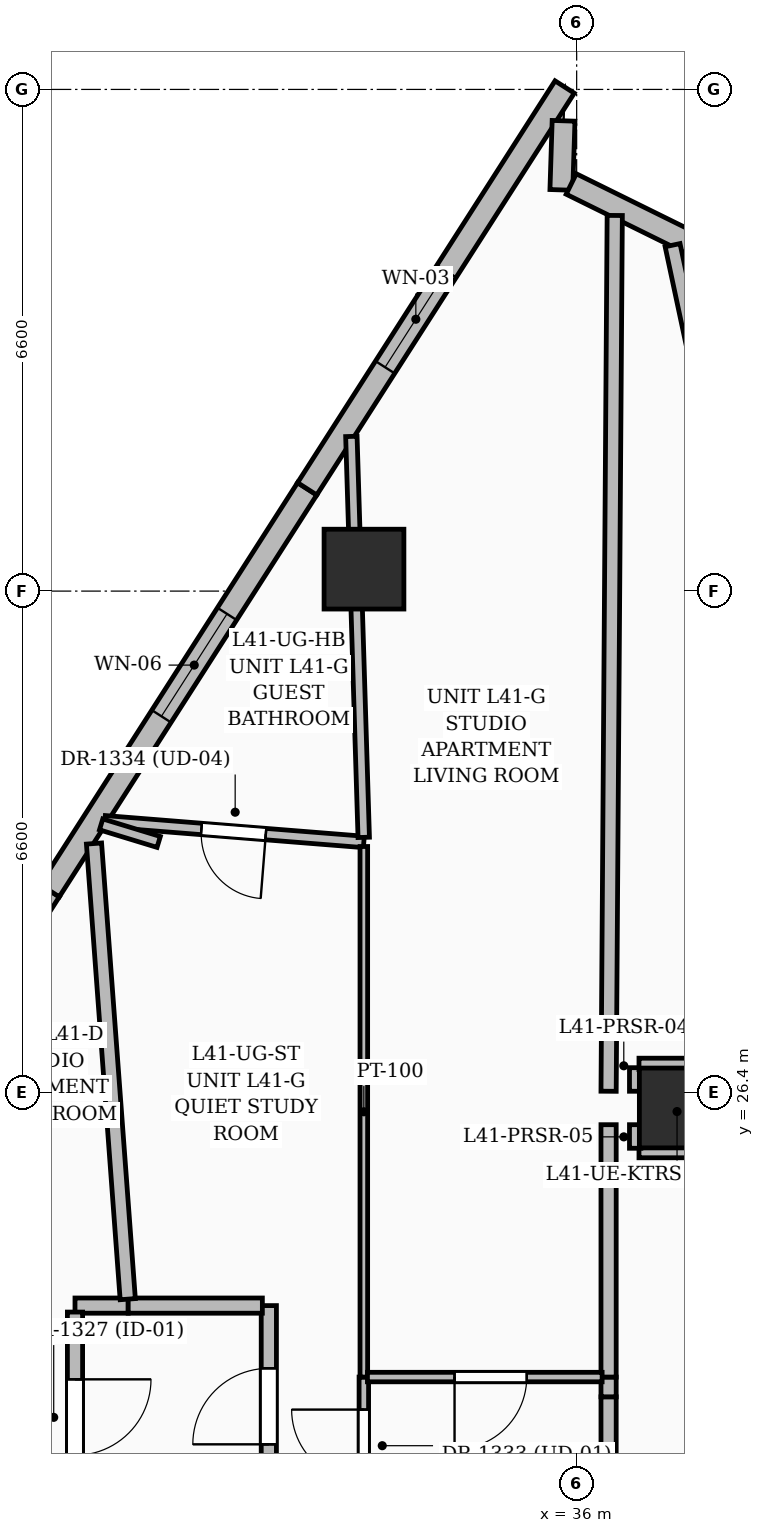
"""IFC4 building model, lengths in metres.
Left out: names, types, materials, properties, quantities, classifications, styles, units other than length and angle.
Written with IfcOpenShell. Run it as: python <this file> out.ifc"""

import sys

from ifc_helpers import new_model, si_unit, direction, frame, frame_2d, origin, origin_2d, place, context, subcontext, project, spatial, rectangle, extrude, element, fill, save


model = new_model("IFC4")
c1 = context("Model", 3, precision=1e-05, world=origin(), true_north=direction((0.0, 1.0)))
c2 = subcontext(c1, "Body", "Model", "MODEL_VIEW")
j1 = project(units=[si_unit("LENGTHUNIT", "METRE"), si_unit("PLANEANGLEUNIT", "RADIAN")], contexts=[c1])
p1 = place(None, origin())
s1 = spatial("IfcSite", under=j1, at=p1, CompositionType="ELEMENT")
p2 = place(p1, origin())
s2 = spatial("IfcBuilding", under=s1, at=p2, CompositionType="ELEMENT")
p3 = place(p2, frame((0.0, 0.0, 160.8)))
s3 = spatial("IfcBuildingStorey", under=s2, at=p3, CompositionType="ELEMENT", Elevation=160.8)
for number, where, z_axis, x_axis in (
    (1, (37.35, 26.2, 0.0), (0.0, 0.0, 1.0), (1.0, 0.0, 0.0)),
    (2, (33.202, 33.289, 0.0), (0.0, 0.0, 1.0), (1.0, 0.0, 0.0)),
):
    element("IfcColumn", number, at=place(p3, frame(where, z_axis=z_axis, x_axis=x_axis)), inside=s3, PredefinedType="COLUMN", context=c2, shape_type="SweptSolid", body=[
        extrude(rectangle(XDim=1.05, YDim=1.05, at=origin_2d()), origin(), (0.0, 0.0, 1.0), 3.6),
    ])
p4 = place(p3, frame((25.679, 23.772, 0.0), z_axis=(0.0, 0.0, 1.0), x_axis=(0.539489448276, 0.841992360535, 0.0)))
e3 = element("IfcWall", 3, at=p4, inside=s3, PredefinedType="SOLIDWALL", context=c2, shape_type="SweptSolid", body=[
    extrude(rectangle(XDim=6.279, YDim=0.3, at=frame_2d((3.14, 0.0))), origin(), (0.0, 0.0, 1.0), 3.35),
])
p5 = place(p4, frame((2.125, 0.0, 0.6)))
e4 = element("IfcOpeningElement", 4, at=p5, cuts=e3, PredefinedType="OPENING", context=c2, shape_type="SweptSolid", body=[
    extrude(rectangle(XDim=1.8, YDim=2.1, at=frame_2d((0.9, 1.05))), frame((0.0, 0.16, 0.0), z_axis=(0.0, -1.0, 0.0), x_axis=(1.0, 0.0, 0.0)), (0.0, 0.0, 1.0), 0.32),
])
p6 = place(p3, frame((29.067, 29.059, 0.0), z_axis=(0.0, 0.0, 1.0), x_axis=(0.539534675603, 0.841963380333, 0.0)))
e5 = element("IfcWall", 5, at=p6, inside=s3, PredefinedType="SOLIDWALL", context=c2, shape_type="SweptSolid", body=[
    extrude(rectangle(XDim=6.279, YDim=0.3, at=frame_2d((3.139, 0.0))), origin(), (0.0, 0.0, 1.0), 3.35),
])
p7 = place(p6, frame((2.725, 0.0, 0.55)))
e6 = element("IfcOpeningElement", 6, at=p7, cuts=e5, PredefinedType="OPENING", context=c2, shape_type="SweptSolid", body=[
    extrude(rectangle(XDim=1.6, YDim=2.2, at=frame_2d((0.8, 1.1))), frame((0.0, 0.16, 0.0), z_axis=(0.0, -1.0, 0.0), x_axis=(1.0, 0.0, 0.0)), (0.0, 0.0, 1.0), 0.32),
])
p8 = place(p3, frame((32.455, 34.345, 0.0), z_axis=(0.0, 0.0, 1.0), x_axis=(0.539489448276, 0.841992360535, 0.0)))
e7 = element("IfcWall", 7, at=p8, inside=s3, PredefinedType="SOLIDWALL", context=c2, shape_type="SweptSolid", body=[
    extrude(rectangle(XDim=6.279, YDim=0.3, at=frame_2d((3.14, 0.0))), origin(), (0.0, 0.0, 1.0), 3.35),
])
p9 = place(p8, frame((1.9, 0.0, 0.6)))
e8 = element("IfcOpeningElement", 8, at=p9, cuts=e7, PredefinedType="OPENING", context=c2, shape_type="SweptSolid", body=[
    extrude(rectangle(XDim=1.5, YDim=2.1, at=frame_2d((0.75, 1.05))), frame((0.0, 0.16, 0.0), z_axis=(0.0, -1.0, 0.0), x_axis=(1.0, 0.0, 0.0)), (0.0, 0.0, 1.0), 0.32),
])
p10 = place(p3, frame((35.828, 39.187, 0.0), z_axis=(0.0, 0.0, 1.0), x_axis=(-0.031938584897, -0.999489833262, 0.0)))
e9 = element("IfcWall", 9, at=p10, inside=s3, PredefinedType="SOLIDWALL", context=c2, shape_type="SweptSolid", body=[
    extrude(rectangle(XDim=0.91, YDim=0.3, at=frame_2d((0.455, 0.0))), origin(), (0.0, 0.0, 1.0), 3.35),
])
p11 = place(p3, frame((35.928, 38.356, 0.0), z_axis=(0.0, 0.0, 1.0), x_axis=(0.896845505116, -0.442343915922, 0.0)))
e10 = element("IfcWall", 10, at=p11, inside=s3, PredefinedType="SOLIDWALL", context=c2, shape_type="SweptSolid", body=[
    extrude(rectangle(XDim=2.249, YDim=0.3, at=frame_2d((1.125, 0.0))), origin(), (0.0, 0.0, 1.0), 3.35),
])
p12 = place(p3, frame((30.1, 23.6, 0.0), z_axis=(0.0, 0.0, 1.0), x_axis=(-1.0, 0.0, 0.0)))
e11 = element("IfcWall", 11, at=p12, inside=s3, PredefinedType="PARTITIONING", context=c2, shape_type="SweptSolid", body=[
    extrude(rectangle(XDim=0.7, YDim=0.2, at=frame_2d((0.35, 0.0))), origin(), (0.0, 0.0, 1.0), 2.393),
])
p13 = place(p3, frame((29.4, 23.515, 0.0), z_axis=(0.0, 0.0, 1.0), x_axis=(0.0, -1.0, 0.0)))
e12 = element("IfcWall", 12, at=p13, inside=s3, PredefinedType="PARTITIONING", context=c2, shape_type="SweptSolid", body=[
    extrude(rectangle(XDim=2.855, YDim=0.2, at=frame_2d((1.427, 0.0))), origin(), (0.0, 0.0, 1.0), 2.393),
])
p14 = place(p13, frame((0.885, 0.0, 0.0)))
e13 = element("IfcOpeningElement", 13, at=p14, cuts=e12, PredefinedType="OPENING", context=c2, shape_type="SweptSolid", body=[
    extrude(rectangle(XDim=1.0, YDim=2.2, at=frame_2d((0.5, 1.1))), frame((0.0, 0.11, 0.0), z_axis=(0.0, -1.0, 0.0), x_axis=(1.0, 0.0, 0.0)), (0.0, 0.0, 1.0), 0.22),
])
p15 = place(p3, frame((31.95, 20.95, 0.0), z_axis=(0.0, 0.0, 1.0), x_axis=(0.0, 1.0, 0.0)))
e14 = element("IfcWall", 14, at=p15, inside=s3, PredefinedType="PARTITIONING", context=c2, shape_type="SweptSolid", body=[
    extrude(rectangle(XDim=2.65, YDim=0.2, at=frame_2d((1.325, 0.0))), origin(), (0.0, 0.0, 1.0), 2.393),
])
p16 = place(p15, frame((0.825, 0.0, 0.0)))
e15 = element("IfcOpeningElement", 15, at=p16, cuts=e14, PredefinedType="OPENING", context=c2, shape_type="SweptSolid", body=[
    extrude(rectangle(XDim=1.0, YDim=2.2, at=frame_2d((0.5, 1.1))), frame((0.0, 0.11, 0.0), z_axis=(0.0, -1.0, 0.0), x_axis=(1.0, 0.0, 0.0)), (0.0, 0.0, 1.0), 0.22),
])
p17 = place(p3, frame((31.865, 23.6, 0.0), z_axis=(0.0, 0.0, 1.0), x_axis=(-1.0, 0.0, 0.0)))
e16 = element("IfcWall", 16, at=p17, inside=s3, PredefinedType="PARTITIONING", context=c2, shape_type="SweptSolid", body=[
    extrude(rectangle(XDim=1.765, YDim=0.2, at=frame_2d((0.882, 0.0))), origin(), (0.0, 0.0, 1.0), 2.709),
])
p18 = place(p3, frame((30.094, 23.685, 0.0), z_axis=(0.0, 0.0, 1.0), x_axis=(-0.073885151141, 0.997266756912, 0.0)))
e17 = element("IfcWall", 17, at=p18, inside=s3, PredefinedType="PARTITIONING", context=c2, shape_type="SweptSolid", body=[
    extrude(rectangle(XDim=6.01, YDim=0.2, at=frame_2d((3.005, 0.0))), origin(), (0.0, 0.0, 1.0), 2.57),
])
p19 = place(p3, frame((36.42, 22.4, 0.0), z_axis=(0.0, 0.0, 1.0), x_axis=(0.0, -1.0, 0.0)))
e18 = element("IfcWall", 18, at=p19, inside=s3, PredefinedType="PARTITIONING", context=c2, shape_type="SweptSolid", body=[
    extrude(rectangle(XDim=4.565, YDim=0.2, at=frame_2d((2.282, 0.0))), origin(), (0.0, 0.0, 1.0), 2.853),
])
p20 = place(p3, frame((36.42, 22.66, 0.0), z_axis=(0.0, 0.0, 1.0), x_axis=(0.0, -1.0, 0.0)))
e19 = element("IfcWall", 19, at=p20, inside=s3, PredefinedType="PARTITIONING", context=c2, shape_type="SweptSolid", body=[
    extrude(rectangle(XDim=0.26, YDim=0.2, at=frame_2d((0.13, 0.0))), origin(), (0.0, 0.0, 1.0), 3.35),
])
p21 = place(p3, frame((36.42, 25.98, 0.0), z_axis=(0.0, 0.0, 1.0), x_axis=(0.0, -1.0, 0.0)))
e20 = element("IfcWall", 20, at=p21, inside=s3, PredefinedType="PARTITIONING", context=c2, shape_type="SweptSolid", body=[
    extrude(rectangle(XDim=3.32, YDim=0.2, at=frame_2d((1.66, 0.0))), origin(), (0.0, 0.0, 1.0), 2.436),
])
p22 = place(p3, frame((36.501, 37.942, 0.0), z_axis=(0.0, 0.0, 1.0), x_axis=(-0.007034618495, -0.999975256765, 0.0)))
e21 = element("IfcWall", 21, at=p22, inside=s3, PredefinedType="PARTITIONING", context=c2, shape_type="SweptSolid", body=[
    extrude(rectangle(XDim=11.522, YDim=0.2, at=frame_2d((5.761, 0.0))), origin(), (0.0, 0.0, 1.0), 2.393),
])
p23 = place(p3, frame((38.83, 30.21, 0.0), z_axis=(0.0, 0.0, 1.0), x_axis=(-0.208896033751, 0.977937854407, 0.0)))
e22 = element("IfcWall", 22, at=p23, inside=s3, PredefinedType="PARTITIONING", context=c2, shape_type="SweptSolid", body=[
    extrude(rectangle(XDim=7.507, YDim=0.2, at=frame_2d((3.753, 0.0))), origin(), (0.0, 0.0, 1.0), 2.57),
])
p24 = place(p3, frame((33.2, 29.7, 0.0), z_axis=(0.0, 0.0, 1.0), x_axis=(-0.996817095408, 0.079722508132, 0.0)))
e23 = element("IfcWall", 23, at=p24, inside=s3, PredefinedType="PARTITIONING", context=c2, shape_type="SweptSolid", body=[
    extrude(rectangle(XDim=3.418, YDim=0.15, at=frame_2d((1.709, 0.0))), origin(), (0.0, 0.0, 1.0), 2.57),
])
p25 = place(p24, frame((1.293, 0.0, 0.0)))
e24 = element("IfcOpeningElement", 24, at=p25, cuts=e23, PredefinedType="OPENING", context=c2, shape_type="SweptSolid", body=[
    extrude(rectangle(XDim=0.85, YDim=2.1, at=frame_2d((0.425, 1.05))), frame((0.0, 0.085, 0.0), z_axis=(0.0, -1.0, 0.0), x_axis=(1.0, 0.0, 0.0)), (0.0, 0.0, 1.0), 0.17),
])
p26 = place(p3, frame((33.2, 20.998, 0.0), z_axis=(0.0, 0.0, 1.0), x_axis=(0.0, 1.0, 0.0)))
e25 = element("IfcWall", 25, at=p26, inside=s3, PredefinedType="PARTITIONING", context=c2, shape_type="SweptSolid", body=[
    extrude(rectangle(XDim=1.662, YDim=0.125, at=frame_2d((0.831, 0.0))), origin(), (0.0, 0.0, 1.0), 2.709),
])
p27 = place(p26, frame((0.284, 0.0, 0.0)))
e26 = element("IfcOpeningElement", 26, at=p27, cuts=e25, PredefinedType="OPENING", context=c2, shape_type="SweptSolid", body=[
    extrude(rectangle(XDim=0.95, YDim=2.2, at=frame_2d((0.475, 1.1))), frame((0.0, 0.072, 0.0), z_axis=(0.0, -1.0, 0.0), x_axis=(1.0, 0.0, 0.0)), (0.0, 0.0, 1.0), 0.145),
])
p28 = place(p3, frame((33.2, 22.66, 0.0), z_axis=(0.0, 0.0, 1.0), x_axis=(0.0, 1.0, 0.0)))
e27 = element("IfcWall", 27, at=p28, inside=s3, PredefinedType="PARTITIONING", context=c2, shape_type="SweptSolid", body=[
    extrude(rectangle(XDim=6.98, YDim=0.1, at=frame_2d((3.49, 0.0))), origin(), (0.0, 0.0, 1.0), 2.709),
])
p29 = place(p3, frame((33.199, 29.76, 0.0), z_axis=(0.0, 0.0, 1.0), x_axis=(-0.030856354446, 0.999523829326, 0.0)))
e28 = element("IfcWall", 28, at=p29, inside=s3, PredefinedType="PARTITIONING", context=c2, shape_type="SweptSolid", body=[
    extrude(rectangle(XDim=5.277, YDim=0.15, at=frame_2d((2.639, 0.0))), origin(), (0.0, 0.0, 1.0), 2.57),
])
p30 = place(p3, frame((36.335, 22.66, 0.0), z_axis=(0.0, 0.0, 1.0), x_axis=(-1.0, 0.0, 0.0)))
e29 = element("IfcWall", 29, at=p30, inside=s3, PredefinedType="PARTITIONING", context=c2, shape_type="SweptSolid", body=[
    extrude(rectangle(XDim=3.087, YDim=0.125, at=frame_2d((1.544, 0.0))), origin(), (0.0, 0.0, 1.0), 2.436),
])
p31 = place(p30, frame((0.991, 0.0, 0.0)))
e30 = element("IfcOpeningElement", 30, at=p31, cuts=e29, PredefinedType="OPENING", context=c2, shape_type="SweptSolid", body=[
    extrude(rectangle(XDim=0.95, YDim=2.2, at=frame_2d((0.475, 1.1))), frame((0.0, 0.072, 0.0), z_axis=(0.0, -1.0, 0.0), x_axis=(1.0, 0.0, 0.0)), (0.0, 0.0, 1.0), 0.145),
])
p32 = place(p3, frame((29.744, 29.931, 0.0), z_axis=(0.0, 0.0, 1.0), x_axis=(0.956483166449, -0.291787512241, 0.0)))
e31 = element("IfcWall", 31, at=p32, inside=s3, PredefinedType="PARTITIONING", context=c2, shape_type="SweptSolid", body=[
    extrude(rectangle(XDim=0.792, YDim=0.15, at=frame_2d((0.396, 0.0))), origin(), (0.0, 0.0, 1.0), 3.35),
])
p33 = place(p3, frame((36.77, 26.42, 0.0), z_axis=(0.0, 0.0, 1.0), x_axis=(0.0, 1.0, 0.0)))
e32 = element("IfcWall", 32, at=p33, inside=s3, PredefinedType="PARTITIONING", context=c2, shape_type="SweptSolid", body=[
    extrude(rectangle(XDim=0.31, YDim=0.15, at=frame_2d((0.155, 0.0))), origin(), (0.0, 0.0, 1.0), 2.393),
])
p34 = place(p3, frame((36.82, 26.78, 0.0), z_axis=(0.0, 0.0, 1.0), x_axis=(1.0, 0.0, 0.0)))
e33 = element("IfcWall", 33, at=p34, inside=s3, PredefinedType="PARTITIONING", context=c2, shape_type="SweptSolid", body=[
    extrude(rectangle(XDim=1.07, YDim=0.15, at=frame_2d((0.535, 0.0))), origin(), (0.0, 0.0, 1.0), 2.393),
])
p35 = place(p3, frame((37.89, 25.62, 0.0), z_axis=(0.0, 0.0, 1.0), x_axis=(-1.0, 0.0, 0.0)))
e34 = element("IfcWall", 34, at=p35, inside=s3, PredefinedType="PARTITIONING", context=c2, shape_type="SweptSolid", body=[
    extrude(rectangle(XDim=1.07, YDim=0.15, at=frame_2d((0.535, 0.0))), origin(), (0.0, 0.0, 1.0), 2.436),
])
p36 = place(p3, frame((36.77, 25.67, 0.0), z_axis=(0.0, 0.0, 1.0), x_axis=(0.0, 1.0, 0.0)))
e35 = element("IfcWall", 35, at=p36, inside=s3, PredefinedType="PARTITIONING", context=c2, shape_type="SweptSolid", body=[
    extrude(rectangle(XDim=0.31, YDim=0.15, at=frame_2d((0.155, 0.0))), origin(), (0.0, 0.0, 1.0), 3.35),
])
p37 = place(p7, origin())
e36 = element("IfcWindow", 36, at=p37, inside=s3, PartitioningType="SINGLE_PANEL", PredefinedType="WINDOW", context=c2, shape_type="SweptSolid", body=[
    extrude(rectangle(XDim=1.6, YDim=2.2, at=frame_2d((0.8, 1.1))), frame((0.0, 0.03, 0.0), z_axis=(0.0, -1.0, 0.0), x_axis=(1.0, 0.0, 0.0)), (0.0, 0.0, 1.0), 0.06),
])
fill(e6, e36)
p38 = place(p9, origin())
e37 = element("IfcWindow", 37, at=p38, inside=s3, PartitioningType="SINGLE_PANEL", PredefinedType="WINDOW", context=c2, shape_type="SweptSolid", body=[
    extrude(rectangle(XDim=1.5, YDim=2.1, at=frame_2d((0.75, 1.05))), frame((0.0, 0.03, 0.0), z_axis=(0.0, -1.0, 0.0), x_axis=(1.0, 0.0, 0.0)), (0.0, 0.0, 1.0), 0.06),
])
fill(e8, e37)
p39 = place(p14, origin())
e38 = element("IfcDoor", 38, at=p39, inside=s3, OperationType="SINGLE_SWING_LEFT", PredefinedType="DOOR", context=c2, shape_type="SweptSolid", body=[
    extrude(rectangle(XDim=1.0, YDim=2.2, at=frame_2d((0.5, 1.1))), frame((0.0, 0.025, 0.0), z_axis=(0.0, -1.0, 0.0), x_axis=(1.0, 0.0, 0.0)), (0.0, 0.0, 1.0), 0.05),
])
fill(e13, e38)
p40 = place(p16, origin())
e39 = element("IfcDoor", 39, at=p40, inside=s3, OperationType="SINGLE_SWING_LEFT", PredefinedType="DOOR", context=c2, shape_type="SweptSolid", body=[
    extrude(rectangle(XDim=1.0, YDim=2.2, at=frame_2d((0.5, 1.1))), frame((0.0, 0.025, 0.0), z_axis=(0.0, -1.0, 0.0), x_axis=(1.0, 0.0, 0.0)), (0.0, 0.0, 1.0), 0.05),
])
fill(e15, e39)
p41 = place(p27, origin())
e40 = element("IfcDoor", 40, at=p41, inside=s3, OperationType="SINGLE_SWING_RIGHT", PredefinedType="DOOR", context=c2, shape_type="SweptSolid", body=[
    extrude(rectangle(XDim=0.95, YDim=2.2, at=frame_2d((0.475, 1.1))), frame((0.0, 0.025, 0.0), z_axis=(0.0, -1.0, 0.0), x_axis=(1.0, 0.0, 0.0)), (0.0, 0.0, 1.0), 0.05),
])
fill(e26, e40)
p42 = place(p25, origin())
e41 = element("IfcDoor", 41, at=p42, inside=s3, OperationType="SINGLE_SWING_LEFT", PredefinedType="DOOR", context=c2, shape_type="SweptSolid", body=[
    extrude(rectangle(XDim=0.85, YDim=2.1, at=frame_2d((0.425, 1.05))), frame((0.0, 0.025, 0.0), z_axis=(0.0, -1.0, 0.0), x_axis=(1.0, 0.0, 0.0)), (0.0, 0.0, 1.0), 0.05),
])
fill(e24, e41)
p43 = place(p31, origin())
e42 = element("IfcDoor", 42, at=p43, inside=s3, OperationType="SINGLE_SWING_RIGHT", PredefinedType="DOOR", context=c2, shape_type="SweptSolid", body=[
    extrude(rectangle(XDim=0.95, YDim=2.2, at=frame_2d((0.475, 1.1))), frame((0.0, 0.025, 0.0), z_axis=(0.0, -1.0, 0.0), x_axis=(1.0, 0.0, 0.0)), (0.0, 0.0, 1.0), 0.05),
])
fill(e30, e42)
save(model, sys.argv[1])
